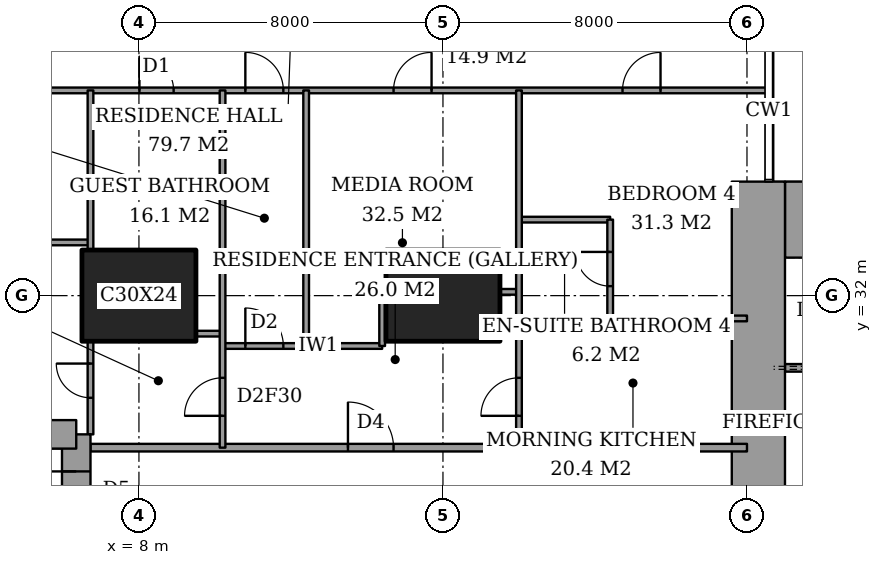
"""IFC4 building model, lengths in metres.
Left out: names, types, materials, properties, quantities, classifications, styles, units other than length and angle.
Written with IfcOpenShell. Run it as: python <this file> out.ifc"""

import sys

from ifc_helpers import new_model, si_unit, direction, frame, frame_2d, origin, origin_2d, place, context, subcontext, project, spatial, rectangle, extrude, element, fill, save


model = new_model("IFC4")
c1 = context("Model", 3, precision=1e-05, world=origin(), true_north=direction((0.0, 1.0)))
c2 = subcontext(c1, "Body", "Model", "MODEL_VIEW")
j1 = project(units=[si_unit("LENGTHUNIT", "METRE"), si_unit("PLANEANGLEUNIT", "RADIAN")], contexts=[c1])
p1 = place(None, origin())
s1 = spatial("IfcSite", under=j1, at=p1, CompositionType="ELEMENT")
p2 = place(p1, origin())
s2 = spatial("IfcBuilding", under=s1, at=p2, CompositionType="ELEMENT")
p3 = place(p2, frame((0.0, 0.0, 193.0)))
s3 = spatial("IfcBuildingStorey", under=s2, at=p3, CompositionType="ELEMENT", Elevation=193.0)
for number, where, z_axis, x_axis in (
    (1, (8.0, 32.0, 0.0), (0.0, 0.0, 1.0), (1.0, 0.0, 0.0)),
    (2, (16.0, 32.0, 0.0), (0.0, 0.0, 1.0), (1.0, 0.0, 0.0)),
):
    element("IfcColumn", number, at=place(p3, frame(where, z_axis=z_axis, x_axis=x_axis)), inside=s3, PredefinedType="COLUMN", context=c2, shape_type="SweptSolid", body=[
        extrude(rectangle(XDim=3.0, YDim=2.4, at=origin_2d()), origin(), (0.0, 0.0, 1.0), 3.6),
    ])
p4 = place(p3, frame((25.0, 34.0, 0.0), z_axis=(0.0, 0.0, 1.0), x_axis=(1.0, 0.0, 0.0)))
e3 = element("IfcWall", 3, at=p4, inside=s3, PredefinedType="SHEAR", context=c2, shape_type="SweptSolid", body=[
    extrude(rectangle(XDim=3.15, YDim=2.0, at=frame_2d((1.575, 0.0))), origin(), (0.0, 0.0, 1.0), 3.6),
])
p5 = place(p3, frame((24.3, 23.15, 0.0), z_axis=(0.0, 0.0, 1.0), x_axis=(0.0, 1.0, 0.0)))
e4 = element("IfcWall", 4, at=p5, inside=s3, PredefinedType="SHEAR", context=c2, shape_type="SweptSolid", body=[
    extrude(rectangle(XDim=11.85, YDim=1.4, at=frame_2d((5.925, 0.0))), origin(), (0.0, 0.0, 1.0), 3.6),
])
p6 = place(p5, frame((0.75, 0.0, 0.0)))
e5 = element("IfcOpeningElement", 5, at=p6, cuts=e4, PredefinedType="OPENING", context=c2, shape_type="SweptSolid", body=[
    extrude(rectangle(XDim=1.8, YDim=2.4, at=frame_2d((0.9, 1.2))), frame((0.0, 0.71, 0.0), z_axis=(0.0, -1.0, 0.0), x_axis=(1.0, 0.0, 0.0)), (0.0, 0.0, 1.0), 1.42),
])
p7 = place(p3, frame((6.35, 19.65, 0.0), z_axis=(0.0, 0.0, 1.0), x_axis=(0.0, 1.0, 0.0)))
e6 = element("IfcWall", 6, at=p7, inside=s3, PredefinedType="SHEAR", context=c2, shape_type="SweptSolid", body=[
    extrude(rectangle(XDim=8.7, YDim=0.75, at=frame_2d((4.35, 0.0))), origin(), (0.0, 0.0, 1.0), 3.6),
])
p8 = place(p7, frame((6.725, 0.0, 0.0)))
e7 = element("IfcOpeningElement", 7, at=p8, cuts=e6, PredefinedType="OPENING", context=c2, shape_type="SweptSolid", body=[
    extrude(rectangle(XDim=1.0, YDim=2.1, at=frame_2d((0.5, 1.05))), frame((0.0, 0.385, 0.0), z_axis=(0.0, -1.0, 0.0), x_axis=(1.0, 0.0, 0.0)), (0.0, 0.0, 1.0), 0.77),
])
p9 = place(p3, frame((6.35, 28.35, 0.0), z_axis=(0.0, 0.0, 1.0), x_axis=(-1.0, 0.0, 0.0)))
e8 = element("IfcWall", 8, at=p9, inside=s3, PredefinedType="SHEAR", context=c2, shape_type="SweptSolid", body=[
    extrude(rectangle(XDim=4.45, YDim=0.75, at=frame_2d((2.225, 0.0))), origin(), (0.0, 0.0, 1.0), 3.6),
])
p10 = place(p3, frame((6.725, 28.0, 0.0), z_axis=(0.0, 0.0, 1.0), x_axis=(1.0, 0.0, 0.0)))
e9 = element("IfcWall", 9, at=p10, inside=s3, PredefinedType="PARTITIONING", context=c2, shape_type="SweptSolid", body=[
    extrude(rectangle(XDim=17.275, YDim=0.2, at=frame_2d((8.637, 0.0))), origin(), (0.0, 0.0, 1.0), 3.35),
])
p11 = place(p10, frame((6.775, 0.0, 0.0)))
e10 = element("IfcOpeningElement", 10, at=p11, cuts=e9, PredefinedType="OPENING", context=c2, shape_type="SweptSolid", body=[
    extrude(rectangle(XDim=1.2, YDim=2.4, at=frame_2d((0.6, 1.2))), frame((0.0, 0.11, 0.0), z_axis=(0.0, -1.0, 0.0), x_axis=(1.0, 0.0, 0.0)), (0.0, 0.0, 1.0), 0.22),
])
p12 = place(p3, frame((10.2, 30.675, 0.0), z_axis=(0.0, 0.0, 1.0), x_axis=(1.0, 0.0, 0.0)))
e11 = element("IfcWall", 11, at=p12, inside=s3, PredefinedType="PARTITIONING", context=c2, shape_type="SweptSolid", body=[
    extrude(rectangle(XDim=4.2, YDim=0.15, at=frame_2d((2.1, 0.0))), origin(), (0.0, 0.0, 1.0), 3.35),
])
p13 = place(p12, frame((0.6, 0.0, 0.0)))
e12 = element("IfcOpeningElement", 12, at=p13, cuts=e11, PredefinedType="OPENING", context=c2, shape_type="SweptSolid", body=[
    extrude(rectangle(XDim=1.0, YDim=2.1, at=frame_2d((0.5, 1.05))), frame((0.0, 0.085, 0.0), z_axis=(0.0, -1.0, 0.0), x_axis=(1.0, 0.0, 0.0)), (0.0, 0.0, 1.0), 0.17),
])
p14 = place(p3, frame((9.5, 31.0, 0.0), z_axis=(0.0, 0.0, 1.0), x_axis=(1.0, 0.0, 0.0)))
e13 = element("IfcWall", 13, at=p14, inside=s3, PredefinedType="PARTITIONING", context=c2, shape_type="SweptSolid", body=[
    extrude(rectangle(XDim=0.7, YDim=0.15, at=frame_2d((0.35, 0.0))), origin(), (0.0, 0.0, 1.0), 3.35),
])
p15 = place(p3, frame((18.0, 31.4, 0.0), z_axis=(0.0, 0.0, 1.0), x_axis=(1.0, 0.0, 0.0)))
e14 = element("IfcWall", 14, at=p15, inside=s3, PredefinedType="PARTITIONING", context=c2, shape_type="SweptSolid", body=[
    extrude(rectangle(XDim=6.0, YDim=0.15, at=frame_2d((3.0, 0.0))), origin(), (0.0, 0.0, 1.0), 3.35),
])
p16 = place(p3, frame((17.5, 32.1, 0.0), z_axis=(0.0, 0.0, 1.0), x_axis=(1.0, 0.0, 0.0)))
e15 = element("IfcWall", 15, at=p16, inside=s3, PredefinedType="PARTITIONING", context=c2, shape_type="SweptSolid", body=[
    extrude(rectangle(XDim=0.5, YDim=0.15, at=frame_2d((0.25, 0.0))), origin(), (0.0, 0.0, 1.0), 2.634),
])
p17 = place(p3, frame((-0.45, 33.4, 0.0), z_axis=(0.0, 0.0, 1.0), x_axis=(1.0, 0.0, 0.0)))
e16 = element("IfcWall", 16, at=p17, inside=s3, PredefinedType="PARTITIONING", context=c2, shape_type="SweptSolid", body=[
    extrude(rectangle(XDim=7.175, YDim=0.15, at=frame_2d((3.587, 0.0))), origin(), (0.0, 0.0, 1.0), 3.35),
])
p18 = place(p3, frame((18.0, 34.0, 0.0), z_axis=(0.0, 0.0, 1.0), x_axis=(1.0, 0.0, 0.0)))
e17 = element("IfcWall", 17, at=p18, inside=s3, PredefinedType="PARTITIONING", context=c2, shape_type="SweptSolid", body=[
    extrude(rectangle(XDim=2.4, YDim=0.15, at=frame_2d((1.2, 0.0))), origin(), (0.0, 0.0, 1.0), 3.35),
])
p19 = place(p3, frame((-0.45, 37.4, 0.0), z_axis=(0.0, 0.0, 1.0), x_axis=(1.0, 0.0, 0.0)))
e18 = element("IfcWall", 18, at=p19, inside=s3, PredefinedType="PARTITIONING", context=c2, shape_type="SweptSolid", body=[
    extrude(rectangle(XDim=25.011, YDim=0.15, at=frame_2d((12.505, 0.0))), origin(), (0.0, 0.0, 1.0), 3.35),
])
p20 = place(p19, frame((11.25, 0.0, 0.0)))
e19 = element("IfcOpeningElement", 19, at=p20, cuts=e18, PredefinedType="OPENING", context=c2, shape_type="SweptSolid", body=[
    extrude(rectangle(XDim=1.0, YDim=2.1, at=frame_2d((0.5, 1.05))), frame((0.0, 0.085, 0.0), z_axis=(0.0, -1.0, 0.0), x_axis=(1.0, 0.0, 0.0)), (0.0, 0.0, 1.0), 0.17),
])
p21 = place(p19, frame((3.087, 0.0, 0.0)))
e20 = element("IfcOpeningElement", 20, at=p21, cuts=e18, PredefinedType="OPENING", context=c2, shape_type="SweptSolid", body=[
    extrude(rectangle(XDim=1.0, YDim=2.1, at=frame_2d((0.5, 1.05))), frame((0.0, 0.085, 0.0), z_axis=(0.0, -1.0, 0.0), x_axis=(1.0, 0.0, 0.0)), (0.0, 0.0, 1.0), 0.17),
])
p22 = place(p19, frame((8.462, 0.0, 0.0)))
e21 = element("IfcOpeningElement", 21, at=p22, cuts=e18, PredefinedType="OPENING", context=c2, shape_type="SweptSolid", body=[
    extrude(rectangle(XDim=0.9, YDim=2.1, at=frame_2d((0.45, 1.05))), frame((0.0, 0.085, 0.0), z_axis=(0.0, -1.0, 0.0), x_axis=(1.0, 0.0, 0.0)), (0.0, 0.0, 1.0), 0.17),
])
p23 = place(p19, frame((15.15, 0.0, 0.0)))
e22 = element("IfcOpeningElement", 22, at=p23, cuts=e18, PredefinedType="OPENING", context=c2, shape_type="SweptSolid", body=[
    extrude(rectangle(XDim=1.0, YDim=2.1, at=frame_2d((0.5, 1.05))), frame((0.0, 0.085, 0.0), z_axis=(0.0, -1.0, 0.0), x_axis=(1.0, 0.0, 0.0)), (0.0, 0.0, 1.0), 0.17),
])
p24 = place(p19, frame((21.175, 0.0, 0.0)))
e23 = element("IfcOpeningElement", 23, at=p24, cuts=e18, PredefinedType="OPENING", context=c2, shape_type="SweptSolid", body=[
    extrude(rectangle(XDim=1.0, YDim=2.1, at=frame_2d((0.5, 1.05))), frame((0.0, 0.085, 0.0), z_axis=(0.0, -1.0, 0.0), x_axis=(1.0, 0.0, 0.0)), (0.0, 0.0, 1.0), 0.17),
])
p25 = place(p3, frame((6.725, 28.35, 0.0), z_axis=(0.0, 0.0, 1.0), x_axis=(0.0, 1.0, 0.0)))
e24 = element("IfcWall", 24, at=p25, inside=s3, PredefinedType="PARTITIONING", context=c2, shape_type="SweptSolid", body=[
    extrude(rectangle(XDim=2.45, YDim=0.15, at=frame_2d((1.225, 0.0))), origin(), (0.0, 0.0, 1.0), 3.35),
])
p26 = place(p25, frame((0.962, 0.0, 0.0)))
e25 = element("IfcOpeningElement", 25, at=p26, cuts=e24, PredefinedType="OPENING", context=c2, shape_type="SweptSolid", body=[
    extrude(rectangle(XDim=0.9, YDim=2.1, at=frame_2d((0.45, 1.05))), frame((0.0, 0.085, 0.0), z_axis=(0.0, -1.0, 0.0), x_axis=(1.0, 0.0, 0.0)), (0.0, 0.0, 1.0), 0.17),
])
p27 = place(p3, frame((6.725, 33.2, 0.0), z_axis=(0.0, 0.0, 1.0), x_axis=(0.0, 1.0, 0.0)))
e26 = element("IfcWall", 26, at=p27, inside=s3, PredefinedType="PARTITIONING", context=c2, shape_type="SweptSolid", body=[
    extrude(rectangle(XDim=4.2, YDim=0.15, at=frame_2d((2.1, 0.0))), origin(), (0.0, 0.0, 1.0), 3.35),
])
p28 = place(p3, frame((10.2, 28.0, 0.0), z_axis=(0.0, 0.0, 1.0), x_axis=(0.0, 1.0, 0.0)))
e27 = element("IfcWall", 27, at=p28, inside=s3, PredefinedType="PARTITIONING", context=c2, shape_type="SweptSolid", body=[
    extrude(rectangle(XDim=9.4, YDim=0.15, at=frame_2d((4.7, 0.0))), origin(), (0.0, 0.0, 1.0), 3.35),
])
p29 = place(p28, frame((0.837, 0.0, 0.0)))
e28 = element("IfcOpeningElement", 28, at=p29, cuts=e27, PredefinedType="OPENING", context=c2, shape_type="SweptSolid", body=[
    extrude(rectangle(XDim=1.0, YDim=2.1, at=frame_2d((0.5, 1.05))), frame((0.0, 0.085, 0.0), z_axis=(0.0, -1.0, 0.0), x_axis=(1.0, 0.0, 0.0)), (0.0, 0.0, 1.0), 0.17),
])
p30 = place(p3, frame((12.4, 30.675, 0.0), z_axis=(0.0, 0.0, 1.0), x_axis=(0.0, 1.0, 0.0)))
e29 = element("IfcWall", 29, at=p30, inside=s3, PredefinedType="PARTITIONING", context=c2, shape_type="SweptSolid", body=[
    extrude(rectangle(XDim=6.725, YDim=0.15, at=frame_2d((3.362, 0.0))), origin(), (0.0, 0.0, 1.0), 3.35),
])
p31 = place(p3, frame((14.4, 30.675, 0.0), z_axis=(0.0, 0.0, 1.0), x_axis=(0.0, 1.0, 0.0)))
e30 = element("IfcWall", 30, at=p31, inside=s3, PredefinedType="PARTITIONING", context=c2, shape_type="SweptSolid", body=[
    extrude(rectangle(XDim=1.425, YDim=0.15, at=frame_2d((0.712, 0.0))), origin(), (0.0, 0.0, 1.0), 3.35),
])
p32 = place(p3, frame((18.0, 28.0, 0.0), z_axis=(0.0, 0.0, 1.0), x_axis=(0.0, 1.0, 0.0)))
e31 = element("IfcWall", 31, at=p32, inside=s3, PredefinedType="PARTITIONING", context=c2, shape_type="SweptSolid", body=[
    extrude(rectangle(XDim=9.4, YDim=0.15, at=frame_2d((4.7, 0.0))), origin(), (0.0, 0.0, 1.0), 3.35),
])
p33 = place(p32, frame((0.837, 0.0, 0.0)))
e32 = element("IfcOpeningElement", 32, at=p33, cuts=e31, PredefinedType="OPENING", context=c2, shape_type="SweptSolid", body=[
    extrude(rectangle(XDim=1.0, YDim=2.1, at=frame_2d((0.5, 1.05))), frame((0.0, 0.085, 0.0), z_axis=(0.0, -1.0, 0.0), x_axis=(1.0, 0.0, 0.0)), (0.0, 0.0, 1.0), 0.17),
])
p34 = place(p3, frame((20.4, 31.4, 0.0), z_axis=(0.0, 0.0, 1.0), x_axis=(0.0, 1.0, 0.0)))
e33 = element("IfcWall", 33, at=p34, inside=s3, PredefinedType="PARTITIONING", context=c2, shape_type="SweptSolid", body=[
    extrude(rectangle(XDim=2.6, YDim=0.15, at=frame_2d((1.3, 0.0))), origin(), (0.0, 0.0, 1.0), 3.35),
])
p35 = place(p34, frame((0.85, 0.0, 0.0)))
e34 = element("IfcOpeningElement", 34, at=p35, cuts=e33, PredefinedType="OPENING", context=c2, shape_type="SweptSolid", body=[
    extrude(rectangle(XDim=0.9, YDim=2.1, at=frame_2d((0.45, 1.05))), frame((0.0, 0.085, 0.0), z_axis=(0.0, -1.0, 0.0), x_axis=(1.0, 0.0, 0.0)), (0.0, 0.0, 1.0), 0.17),
])
p36 = place(p3, frame((25.0, 30.1, 0.0), z_axis=(0.0, 0.0, 1.0), x_axis=(1.0, 0.0, 0.0)))
e35 = element("IfcWall", 35, at=p36, inside=s3, PredefinedType="PARTITIONING", context=c2, shape_type="SweptSolid", body=[
    extrude(rectangle(XDim=12.7, YDim=0.2, at=frame_2d((6.35, 0.0))), origin(), (0.0, 0.0, 1.0), 3.6),
])
p37 = place(p36, frame((4.25, 0.0, 0.0)))
e36 = element("IfcOpeningElement", 36, at=p37, cuts=e35, PredefinedType="OPENING", context=c2, shape_type="SweptSolid", body=[
    extrude(rectangle(XDim=1.1, YDim=2.1, at=frame_2d((0.55, 1.05))), frame((0.0, 0.11, 0.0), z_axis=(0.0, -1.0, 0.0), x_axis=(1.0, 0.0, 0.0)), (0.0, 0.0, 1.0), 0.22),
])
p38 = place(p36, frame((7.45, 0.0, 0.0)))
e37 = element("IfcOpeningElement", 37, at=p38, cuts=e35, PredefinedType="OPENING", context=c2, shape_type="SweptSolid", body=[
    extrude(rectangle(XDim=1.1, YDim=2.1, at=frame_2d((0.55, 1.05))), frame((0.0, 0.11, 0.0), z_axis=(0.0, -1.0, 0.0), x_axis=(1.0, 0.0, 0.0)), (0.0, 0.0, 1.0), 0.22),
])
p39 = place(p36, frame((10.65, 0.0, 0.0)))
e38 = element("IfcOpeningElement", 38, at=p39, cuts=e35, PredefinedType="OPENING", context=c2, shape_type="SweptSolid", body=[
    extrude(rectangle(XDim=1.1, YDim=2.1, at=frame_2d((0.55, 1.05))), frame((0.0, 0.11, 0.0), z_axis=(0.0, -1.0, 0.0), x_axis=(1.0, 0.0, 0.0)), (0.0, 0.0, 1.0), 0.22),
])
p40 = place(p36, frame((0.9, 0.0, 0.0)))
e39 = element("IfcOpeningElement", 39, at=p40, cuts=e35, PredefinedType="OPENING", context=c2, shape_type="SweptSolid", body=[
    extrude(rectangle(XDim=1.2, YDim=2.1, at=frame_2d((0.6, 1.05))), frame((0.0, 0.11, 0.0), z_axis=(0.0, -1.0, 0.0), x_axis=(1.0, 0.0, 0.0)), (0.0, 0.0, 1.0), 0.22),
])
p41 = place(p20, origin())
e40 = element("IfcDoor", 40, at=p41, inside=s3, OperationType="SINGLE_SWING_RIGHT", PredefinedType="DOOR", context=c2, shape_type="SweptSolid", body=[
    extrude(rectangle(XDim=1.0, YDim=2.1, at=frame_2d((0.5, 1.05))), frame((0.0, 0.025, 0.0), z_axis=(0.0, -1.0, 0.0), x_axis=(1.0, 0.0, 0.0)), (0.0, 0.0, 1.0), 0.05),
])
fill(e19, e40)
p42 = place(p26, origin())
e41 = element("IfcDoor", 41, at=p42, inside=s3, OperationType="SINGLE_SWING_LEFT", PredefinedType="DOOR", context=c2, shape_type="SweptSolid", body=[
    extrude(rectangle(XDim=0.9, YDim=2.1, at=frame_2d((0.45, 1.05))), frame((0.0, 0.025, 0.0), z_axis=(0.0, -1.0, 0.0), x_axis=(1.0, 0.0, 0.0)), (0.0, 0.0, 1.0), 0.05),
])
fill(e25, e41)
p43 = place(p22, origin())
e42 = element("IfcDoor", 42, at=p43, inside=s3, OperationType="SINGLE_SWING_RIGHT", PredefinedType="DOOR", context=c2, shape_type="SweptSolid", body=[
    extrude(rectangle(XDim=0.9, YDim=2.1, at=frame_2d((0.45, 1.05))), frame((0.0, 0.025, 0.0), z_axis=(0.0, -1.0, 0.0), x_axis=(1.0, 0.0, 0.0)), (0.0, 0.0, 1.0), 0.05),
])
fill(e21, e42)
p44 = place(p29, origin())
e43 = element("IfcDoor", 43, at=p44, inside=s3, OperationType="SINGLE_SWING_RIGHT", PredefinedType="DOOR", context=c2, shape_type="SweptSolid", body=[
    extrude(rectangle(XDim=1.0, YDim=2.1, at=frame_2d((0.5, 1.05))), frame((0.0, 0.025, 0.0), z_axis=(0.0, -1.0, 0.0), x_axis=(1.0, 0.0, 0.0)), (0.0, 0.0, 1.0), 0.05),
])
fill(e28, e43)
p45 = place(p11, origin())
e44 = element("IfcDoor", 44, at=p45, inside=s3, OperationType="SINGLE_SWING_RIGHT", PredefinedType="DOOR", context=c2, shape_type="SweptSolid", body=[
    extrude(rectangle(XDim=1.2, YDim=2.4, at=frame_2d((0.6, 1.2))), frame((0.0, 0.025, 0.0), z_axis=(0.0, -1.0, 0.0), x_axis=(1.0, 0.0, 0.0)), (0.0, 0.0, 1.0), 0.05),
])
fill(e10, e44)
p46 = place(p13, origin())
e45 = element("IfcDoor", 45, at=p46, inside=s3, OperationType="SINGLE_SWING_RIGHT", PredefinedType="DOOR", context=c2, shape_type="SweptSolid", body=[
    extrude(rectangle(XDim=1.0, YDim=2.1, at=frame_2d((0.5, 1.05))), frame((0.0, 0.025, 0.0), z_axis=(0.0, -1.0, 0.0), x_axis=(1.0, 0.0, 0.0)), (0.0, 0.0, 1.0), 0.05),
])
fill(e12, e45)
p47 = place(p23, origin())
e46 = element("IfcDoor", 46, at=p47, inside=s3, OperationType="SINGLE_SWING_LEFT", PredefinedType="DOOR", context=c2, shape_type="SweptSolid", body=[
    extrude(rectangle(XDim=1.0, YDim=2.1, at=frame_2d((0.5, 1.05))), frame((0.0, 0.025, 0.0), z_axis=(0.0, -1.0, 0.0), x_axis=(1.0, 0.0, 0.0)), (0.0, 0.0, 1.0), 0.05),
])
fill(e22, e46)
p48 = place(p35, origin())
e47 = element("IfcDoor", 47, at=p48, inside=s3, OperationType="SINGLE_SWING_LEFT", PredefinedType="DOOR", context=c2, shape_type="SweptSolid", body=[
    extrude(rectangle(XDim=0.9, YDim=2.1, at=frame_2d((0.45, 1.05))), frame((0.0, 0.025, 0.0), z_axis=(0.0, -1.0, 0.0), x_axis=(1.0, 0.0, 0.0)), (0.0, 0.0, 1.0), 0.05),
])
fill(e34, e47)
p49 = place(p24, origin())
e48 = element("IfcDoor", 48, at=p49, inside=s3, OperationType="SINGLE_SWING_LEFT", PredefinedType="DOOR", context=c2, shape_type="SweptSolid", body=[
    extrude(rectangle(XDim=1.0, YDim=2.1, at=frame_2d((0.5, 1.05))), frame((0.0, 0.025, 0.0), z_axis=(0.0, -1.0, 0.0), x_axis=(1.0, 0.0, 0.0)), (0.0, 0.0, 1.0), 0.05),
])
fill(e23, e48)
p50 = place(p33, origin())
e49 = element("IfcDoor", 49, at=p50, inside=s3, OperationType="SINGLE_SWING_RIGHT", PredefinedType="DOOR", context=c2, shape_type="SweptSolid", body=[
    extrude(rectangle(XDim=1.0, YDim=2.1, at=frame_2d((0.5, 1.05))), frame((0.0, 0.025, 0.0), z_axis=(0.0, -1.0, 0.0), x_axis=(1.0, 0.0, 0.0)), (0.0, 0.0, 1.0), 0.05),
])
fill(e32, e49)
p51 = place(p8, origin())
e50 = element("IfcDoor", 50, at=p51, inside=s3, OperationType="SINGLE_SWING_LEFT", PredefinedType="DOOR", context=c2, shape_type="SweptSolid", body=[
    extrude(rectangle(XDim=1.0, YDim=2.1, at=frame_2d((0.5, 1.05))), frame((0.0, 0.025, 0.0), z_axis=(0.0, -1.0, 0.0), x_axis=(1.0, 0.0, 0.0)), (0.0, 0.0, 1.0), 0.05),
])
fill(e7, e50)
save(model, sys.argv[1])
